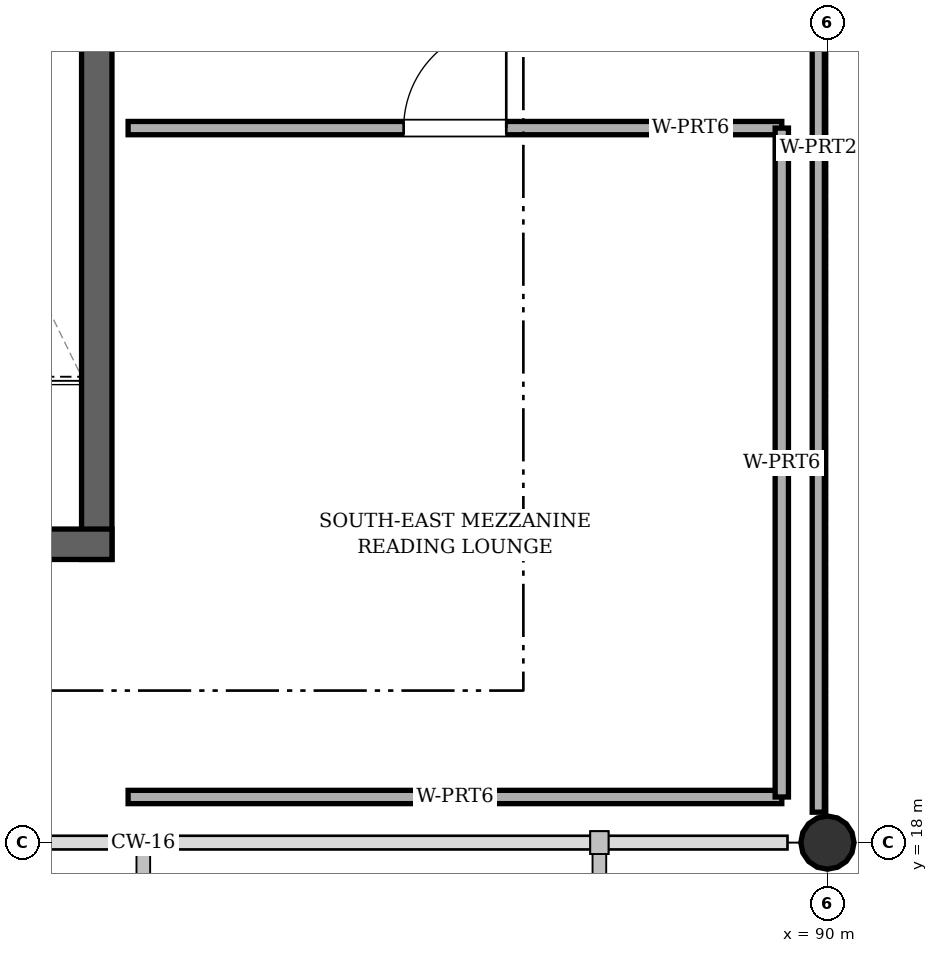
"""IFC4 building model, lengths in metres.
Left out: names, types, materials, properties, quantities, classifications, styles, units other than length and angle.
Written with IfcOpenShell. Run it as: python <this file> out.ifc"""

import sys

from ifc_helpers import new_model, si_unit, direction, frame, frame_2d, origin, origin_2d, place, context, subcontext, project, spatial, rectangle, circle, extrude, element, fill, save


model = new_model("IFC4")
c1 = context("Model", 3, precision=1e-05, world=origin(), true_north=direction((0.0, 1.0)))
c2 = subcontext(c1, "Body", "Model", "MODEL_VIEW")
j1 = project(units=[si_unit("LENGTHUNIT", "METRE"), si_unit("PLANEANGLEUNIT", "RADIAN")], contexts=[c1])
p1 = place(None, origin())
s1 = spatial("IfcSite", under=j1, at=p1, CompositionType="ELEMENT")
p2 = place(p1, origin())
s2 = spatial("IfcBuilding", under=s1, at=p2, CompositionType="ELEMENT")
p3 = place(p2, frame((0.0, 0.0, 10.8)))
s3 = spatial("IfcBuildingStorey", under=s2, at=p3, CompositionType="ELEMENT", Elevation=10.8)
p4 = place(p3, frame((90.0, 18.0, 0.0), z_axis=(0.0, 0.0, 1.0), x_axis=(1.0, 0.0, 0.0)))
e1 = element("IfcColumn", 1, at=p4, inside=s3, PredefinedType="COLUMN", context=c2, shape_type="SweptSolid", body=[
    extrude(circle(Radius=0.35, at=origin_2d()), origin(), (0.0, 0.0, 1.0), 3.35),
])
p5 = place(p3, frame((89.88, 18.4, 0.0), z_axis=(0.0, 0.0, 1.0), x_axis=(0.0, 1.0, 0.0)))
e2 = element("IfcWall", 2, at=p5, inside=s3, PredefinedType="PARTITIONING", context=c2, shape_type="SweptSolid", body=[
    extrude(rectangle(XDim=17.48, YDim=0.16, at=frame_2d((8.74, 0.0))), origin(), (0.0, 0.0, 1.0), 2.15),
])
p6 = place(p3, frame((80.387, 21.725, 0.0), z_axis=(0.0, 0.0, 1.0), x_axis=(0.0, 1.0, 0.0)))
e3 = element("IfcWall", 3, at=p6, inside=s3, PredefinedType="SHEAR", context=c2, shape_type="SweptSolid", body=[
    extrude(rectangle(XDim=10.975, YDim=0.4, at=frame_2d((5.487, 0.0))), origin(), (0.0, 0.0, 1.0), 3.3),
])
p7 = place(p3, frame((75.788, 21.925, 0.0), z_axis=(0.0, 0.0, 1.0), x_axis=(1.0, 0.0, 0.0)))
e4 = element("IfcWall", 4, at=p7, inside=s3, PredefinedType="SHEAR", context=c2, shape_type="SweptSolid", body=[
    extrude(rectangle(XDim=4.8, YDim=0.4, at=frame_2d((2.4, 0.0))), origin(), (0.0, 0.0, 1.0), 3.3),
])
p8 = place(p7, frame((1.1, 0.0, 0.0)))
e5 = element("IfcOpeningElement", 5, at=p8, cuts=e4, PredefinedType="OPENING", context=c2, shape_type="SweptSolid", body=[
    extrude(rectangle(XDim=1.3, YDim=2.1, at=frame_2d((0.65, 1.05))), frame((0.0, 0.21, 0.0), z_axis=(0.0, -1.0, 0.0), x_axis=(1.0, 0.0, 0.0)), (0.0, 0.0, 1.0), 0.42),
])
p9 = place(p3, frame((89.4, 18.6, 0.0), z_axis=(0.0, 0.0, 1.0), x_axis=(-1.0, 0.0, 0.0)))
e6 = element("IfcWall", 6, at=p9, inside=s3, PredefinedType="PARTITIONING", context=c2, shape_type="SweptSolid", body=[
    extrude(rectangle(XDim=8.6, YDim=0.175, at=frame_2d((4.3, 0.0))), origin(), (0.0, 0.0, 1.0), 3.275),
])
p10 = place(p3, frame((80.8, 27.4, 0.0), z_axis=(0.0, 0.0, 1.0), x_axis=(1.0, 0.0, 0.0)))
e7 = element("IfcWall", 7, at=p10, inside=s3, PredefinedType="PARTITIONING", context=c2, shape_type="SweptSolid", body=[
    extrude(rectangle(XDim=8.6, YDim=0.175, at=frame_2d((4.3, 0.0))), origin(), (0.0, 0.0, 1.0), 3.275),
])
p11 = place(p10, frame((3.625, 0.0, 0.0)))
e8 = element("IfcOpeningElement", 8, at=p11, cuts=e7, PredefinedType="OPENING", context=c2, shape_type="SweptSolid", body=[
    extrude(rectangle(XDim=1.35, YDim=2.1, at=frame_2d((0.675, 1.05))), frame((0.0, 0.097, 0.0), z_axis=(0.0, -1.0, 0.0), x_axis=(1.0, 0.0, 0.0)), (0.0, 0.0, 1.0), 0.195),
])
p12 = place(p3, frame((89.4, 27.4, 0.0), z_axis=(0.0, 0.0, 1.0), x_axis=(0.0, -1.0, 0.0)))
e9 = element("IfcWall", 9, at=p12, inside=s3, PredefinedType="PARTITIONING", context=c2, shape_type="SweptSolid", body=[
    extrude(rectangle(XDim=8.8, YDim=0.175, at=frame_2d((4.4, 0.0))), origin(), (0.0, 0.0, 1.0), 3.275),
])
p13 = place(p11, origin())
e10 = element("IfcDoor", 10, at=p13, inside=s3, OperationType="SINGLE_SWING_RIGHT", PredefinedType="DOOR", context=c2, shape_type="SweptSolid", body=[
    extrude(rectangle(XDim=1.35, YDim=2.1, at=frame_2d((0.675, 1.05))), frame((0.0, 0.025, 0.0), z_axis=(0.0, -1.0, 0.0), x_axis=(1.0, 0.0, 0.0)), (0.0, 0.0, 1.0), 0.05),
])
fill(e8, e10)
save(model, sys.argv[1])
